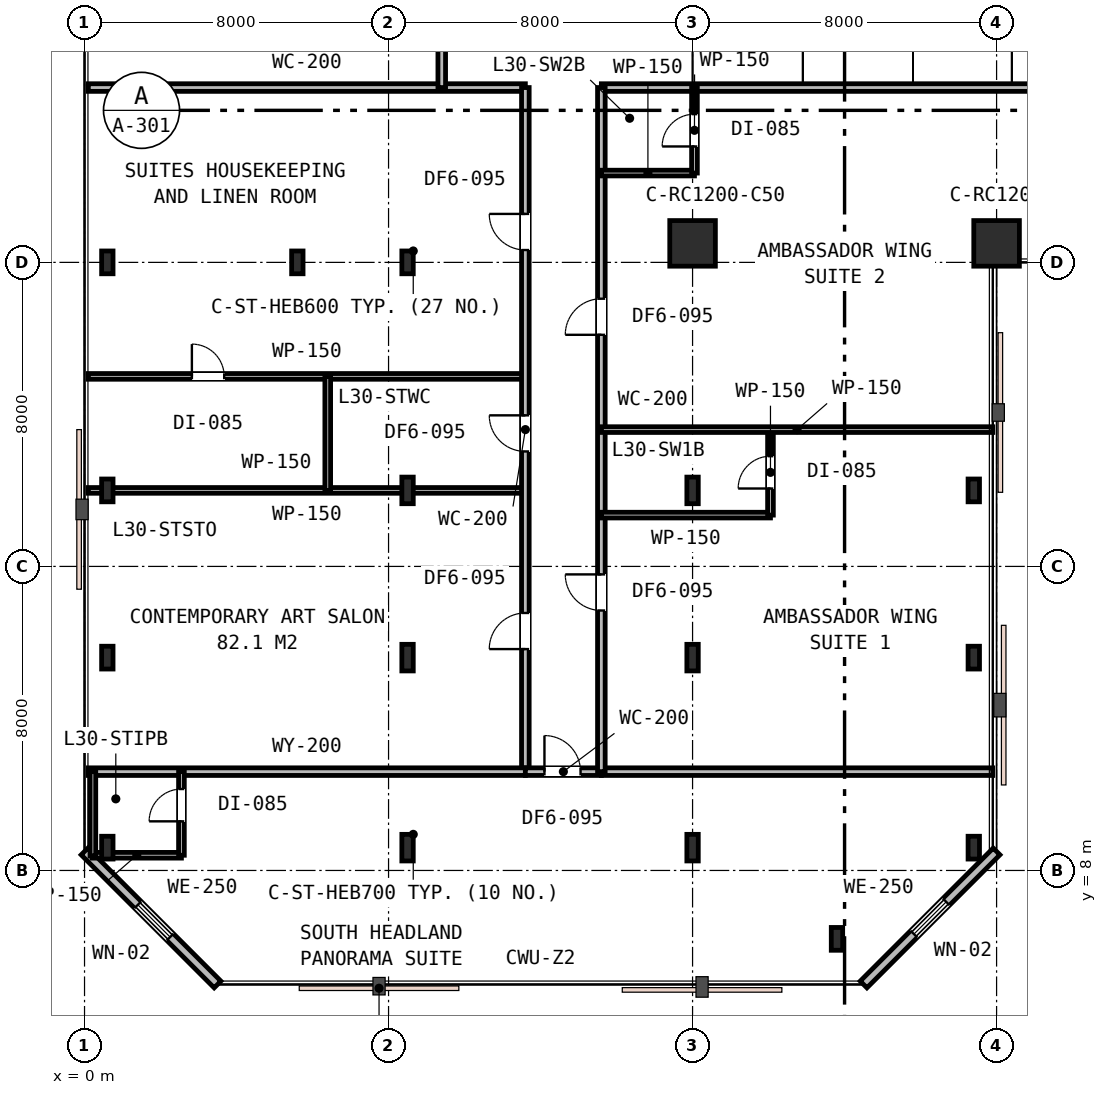
"""IFC4 building model, lengths in metres.
Left out: names, types, materials, properties, quantities, classifications, styles, units other than length and angle.
Written with IfcOpenShell. Run it as: python <this file> out.ifc"""

import sys

from ifc_helpers import new_model, si_unit, direction, frame, frame_2d, origin, origin_2d, place, context, subcontext, project, spatial, rectangle, i_section, extrude, element, fill, save


model = new_model("IFC4")
c1 = context("Model", 3, precision=1e-05, world=origin(), true_north=direction((0.0, 1.0)))
c2 = subcontext(c1, "Body", "Model", "MODEL_VIEW")
j1 = project(units=[si_unit("LENGTHUNIT", "METRE"), si_unit("PLANEANGLEUNIT", "RADIAN")], contexts=[c1])
p1 = place(None, origin())
s1 = spatial("IfcSite", under=j1, at=p1, CompositionType="ELEMENT")
p2 = place(p1, origin())
s2 = spatial("IfcBuilding", under=s1, at=p2, CompositionType="ELEMENT")
p3 = place(p2, frame((0.0, 0.0, 118.8)))
s3 = spatial("IfcBuildingStorey", under=s2, at=p3, CompositionType="ELEMENT", Elevation=118.8)
p4 = place(p3, frame((8.5, 24.0, 0.0), z_axis=(0.0, 0.0, 1.0), x_axis=(1.0, 0.0, 0.0)))
e1 = element("IfcColumn", 1, at=p4, inside=s3, PredefinedType="COLUMN", context=c2, shape_type="SweptSolid", body=[
    extrude(i_section(OverallWidth=0.3, OverallDepth=0.6, WebThickness=0.015, FlangeThickness=0.03, FilletRadius=0.027, at=origin_2d()), origin(), (0.0, 0.0, 1.0), 3.6),
])
for number, where, z_axis, x_axis in (
    (2, (16.0, 24.5, 0.0), (0.0, 0.0, 1.0), (1.0, 0.0, 0.0)),
    (3, (24.0, 24.5, 0.0), (0.0, 0.0, 1.0), (1.0, 0.0, 0.0)),
):
    element("IfcColumn", number, at=place(p3, frame(where, z_axis=z_axis, x_axis=x_axis)), inside=s3, PredefinedType="COLUMN", context=c2, shape_type="SweptSolid", body=[
        extrude(rectangle(XDim=1.2, YDim=1.2, at=origin_2d()), origin(), (0.0, 0.0, 1.0), 3.6),
    ])
for number, where, z_axis, x_axis in (
    (4, (5.6, 24.0, 0.0), (0.0, 0.0, 1.0), (1.0, 0.0, 0.0)),
    (5, (0.6, 24.0, 0.0), (0.0, 0.0, 1.0), (1.0, 0.0, 0.0)),
    (6, (0.6, 8.6, 0.0), (0.0, 0.0, 1.0), (1.0, 0.0, 0.0)),
    (7, (0.6, 13.6, 0.0), (0.0, 0.0, 1.0), (1.0, 0.0, 0.0)),
    (8, (0.6, 18.0, 0.0), (0.0, 0.0, 1.0), (1.0, 0.0, 0.0)),
    (9, (19.8, 6.2, 0.0), (0.0, 0.0, 1.0), (1.0, 0.0, 0.0)),
    (10, (23.4, 8.6, 0.0), (0.0, 0.0, 1.0), (1.0, 0.0, 0.0)),
    (11, (23.4, 13.6, 0.0), (0.0, 0.0, 1.0), (1.0, 0.0, 0.0)),
    (12, (23.4, 18.0, 0.0), (0.0, 0.0, 1.0), (1.0, 0.0, 0.0)),
):
    element("IfcColumn", number, at=place(p3, frame(where, z_axis=z_axis, x_axis=x_axis)), inside=s3, PredefinedType="COLUMN", context=c2, shape_type="SweptSolid", body=[
        extrude(i_section(OverallWidth=0.3, OverallDepth=0.6, WebThickness=0.015, FlangeThickness=0.03, FilletRadius=0.027, at=origin_2d()), origin(), (0.0, 0.0, 1.0), 3.6),
    ])
for number, where, z_axis, x_axis in (
    (13, (8.5, 8.6, 0.0), (0.0, 0.0, 1.0), (1.0, 0.0, 0.0)),
    (14, (16.0, 8.6, 0.0), (0.0, 0.0, 1.0), (1.0, 0.0, 0.0)),
    (15, (8.5, 13.6, 0.0), (0.0, 0.0, 1.0), (1.0, 0.0, 0.0)),
    (16, (16.0, 13.6, 0.0), (0.0, 0.0, 1.0), (1.0, 0.0, 0.0)),
    (17, (8.5, 18.0, 0.0), (0.0, 0.0, 1.0), (1.0, 0.0, 0.0)),
    (18, (16.0, 18.0, 0.0), (0.0, 0.0, 1.0), (1.0, 0.0, 0.0)),
):
    element("IfcColumn", number, at=place(p3, frame(where, z_axis=z_axis, x_axis=x_axis)), inside=s3, PredefinedType="COLUMN", context=c2, shape_type="SweptSolid", body=[
        extrude(i_section(OverallWidth=0.3, OverallDepth=0.7, WebThickness=0.017, FlangeThickness=0.032, FilletRadius=0.027, at=origin_2d()), origin(), (0.0, 0.0, 1.0), 3.6),
    ])
p5 = place(p3, frame((20.5, 5.0, 0.0), z_axis=(0.0, 0.0, 1.0), x_axis=(0.707106781187, 0.707106781187, 0.0)))
e19 = element("IfcWall", 19, at=p5, inside=s3, PredefinedType="STANDARD", context=c2, shape_type="SweptSolid", body=[
    extrude(rectangle(XDim=4.95, YDim=0.25, at=frame_2d((2.475, 0.0))), origin(), (0.0, 0.0, 1.0), 3.33),
])
p6 = place(p5, frame((1.875, 0.0, 0.85)))
e20 = element("IfcOpeningElement", 20, at=p6, cuts=e19, PredefinedType="OPENING", context=c2, shape_type="SweptSolid", body=[
    extrude(rectangle(XDim=1.2, YDim=1.6, at=frame_2d((0.6, 0.8))), frame((0.0, 0.135, 0.0), z_axis=(0.0, -1.0, 0.0), x_axis=(1.0, 0.0, 0.0)), (0.0, 0.0, 1.0), 0.27),
])
p7 = place(p3, frame((0.0, 8.5, 0.0), z_axis=(0.0, 0.0, 1.0), x_axis=(0.707106781187, -0.707106781187, 0.0)))
e21 = element("IfcWall", 21, at=p7, inside=s3, PredefinedType="STANDARD", context=c2, shape_type="SweptSolid", body=[
    extrude(rectangle(XDim=4.95, YDim=0.25, at=frame_2d((2.475, 0.0))), origin(), (0.0, 0.0, 1.0), 3.33),
])
p8 = place(p7, frame((1.985, 0.0, 0.85)))
e22 = element("IfcOpeningElement", 22, at=p8, cuts=e21, PredefinedType="OPENING", context=c2, shape_type="SweptSolid", body=[
    extrude(rectangle(XDim=1.2, YDim=1.6, at=frame_2d((0.6, 0.8))), frame((0.0, 0.135, 0.0), z_axis=(0.0, -1.0, 0.0), x_axis=(1.0, 0.0, 0.0)), (0.0, 0.0, 1.0), 0.27),
])
p9 = place(p3, frame((0.1, 28.6, 0.0), z_axis=(0.0, 0.0, 1.0), x_axis=(1.0, 0.0, 0.0)))
e23 = element("IfcWall", 23, at=p9, inside=s3, PredefinedType="PARTITIONING", context=c2, shape_type="SweptSolid", body=[
    extrude(rectangle(XDim=11.5, YDim=0.2, at=frame_2d((5.75, 0.0))), origin(), (0.0, 0.0, 1.0), 2.87),
])
p10 = place(p3, frame((13.6, 28.6, 0.0), z_axis=(0.0, 0.0, 1.0), x_axis=(1.0, 0.0, 0.0)))
e24 = element("IfcWall", 24, at=p10, inside=s3, PredefinedType="PARTITIONING", context=c2, shape_type="SweptSolid", body=[
    extrude(rectangle(XDim=30.6, YDim=0.2, at=frame_2d((15.3, 0.0))), origin(), (0.0, 0.0, 1.0), 2.87),
])
p11 = place(p10, frame((13.325, 0.0, 0.0)))
e25 = element("IfcOpeningElement", 25, at=p11, cuts=e24, PredefinedType="OPENING", context=c2, shape_type="SweptSolid", body=[
    extrude(rectangle(XDim=0.95, YDim=2.15, at=frame_2d((0.475, 1.075))), frame((0.0, 0.11, 0.0), z_axis=(0.0, -1.0, 0.0), x_axis=(1.0, 0.0, 0.0)), (0.0, 0.0, 1.0), 0.22),
])
p12 = place(p10, frame((18.761, 0.0, 0.0)))
e26 = element("IfcOpeningElement", 26, at=p12, cuts=e24, PredefinedType="OPENING", context=c2, shape_type="SweptSolid", body=[
    extrude(rectangle(XDim=0.95, YDim=2.15, at=frame_2d((0.475, 1.075))), frame((0.0, 0.11, 0.0), z_axis=(0.0, -1.0, 0.0), x_axis=(1.0, 0.0, 0.0)), (0.0, 0.0, 1.0), 0.22),
])
p13 = place(p10, frame((25.503, 0.0, 0.0)))
e27 = element("IfcOpeningElement", 27, at=p13, cuts=e24, PredefinedType="OPENING", context=c2, shape_type="SweptSolid", body=[
    extrude(rectangle(XDim=0.95, YDim=2.15, at=frame_2d((0.475, 1.075))), frame((0.0, 0.11, 0.0), z_axis=(0.0, -1.0, 0.0), x_axis=(1.0, 0.0, 0.0)), (0.0, 0.0, 1.0), 0.22),
])
p14 = place(p3, frame((0.1, 18.0, 0.0), z_axis=(0.0, 0.0, 1.0), x_axis=(1.0, 0.0, 0.0)))
e28 = element("IfcWall", 28, at=p14, inside=s3, PredefinedType="PARTITIONING", context=c2, shape_type="SweptSolid", body=[
    extrude(rectangle(XDim=11.5, YDim=0.15, at=frame_2d((5.75, 0.0))), origin(), (0.0, 0.0, 1.0), 2.87),
])
p15 = place(p3, frame((0.1, 21.0, 0.0), z_axis=(0.0, 0.0, 1.0), x_axis=(1.0, 0.0, 0.0)))
e29 = element("IfcWall", 29, at=p15, inside=s3, PredefinedType="PARTITIONING", context=c2, shape_type="SweptSolid", body=[
    extrude(rectangle(XDim=11.5, YDim=0.15, at=frame_2d((5.75, 0.0))), origin(), (0.0, 0.0, 1.0), 2.87),
])
p16 = place(p15, frame((2.725, 0.0, 0.0)))
e30 = element("IfcOpeningElement", 30, at=p16, cuts=e29, PredefinedType="OPENING", context=c2, shape_type="SweptSolid", body=[
    extrude(rectangle(XDim=0.85, YDim=2.15, at=frame_2d((0.425, 1.075))), frame((0.0, 0.085, 0.0), z_axis=(0.0, -1.0, 0.0), x_axis=(1.0, 0.0, 0.0)), (0.0, 0.0, 1.0), 0.17),
])
p17 = place(p3, frame((6.4, 18.0, 0.0), z_axis=(0.0, 0.0, 1.0), x_axis=(0.0, 1.0, 0.0)))
e31 = element("IfcWall", 31, at=p17, inside=s3, PredefinedType="PARTITIONING", context=c2, shape_type="SweptSolid", body=[
    extrude(rectangle(XDim=3.0, YDim=0.15, at=frame_2d((1.5, 0.0))), origin(), (0.0, 0.0, 1.0), 2.87),
])
p18 = place(p3, frame((11.6, 10.6, 0.0), z_axis=(0.0, 0.0, 1.0), x_axis=(0.0, 1.0, 0.0)))
e32 = element("IfcWall", 32, at=p18, inside=s3, PredefinedType="PARTITIONING", context=c2, shape_type="SweptSolid", body=[
    extrude(rectangle(XDim=18.0, YDim=0.2, at=frame_2d((9.0, 0.0))), origin(), (0.0, 0.0, 1.0), 2.87),
])
p19 = place(p18, frame((8.425, 0.0, 0.0)))
e33 = element("IfcOpeningElement", 33, at=p19, cuts=e32, PredefinedType="OPENING", context=c2, shape_type="SweptSolid", body=[
    extrude(rectangle(XDim=0.95, YDim=2.15, at=frame_2d((0.475, 1.075))), frame((0.0, 0.11, 0.0), z_axis=(0.0, -1.0, 0.0), x_axis=(1.0, 0.0, 0.0)), (0.0, 0.0, 1.0), 0.22),
])
p20 = place(p18, frame((13.725, 0.0, 0.0)))
e34 = element("IfcOpeningElement", 34, at=p20, cuts=e32, PredefinedType="OPENING", context=c2, shape_type="SweptSolid", body=[
    extrude(rectangle(XDim=0.95, YDim=2.15, at=frame_2d((0.475, 1.075))), frame((0.0, 0.11, 0.0), z_axis=(0.0, -1.0, 0.0), x_axis=(1.0, 0.0, 0.0)), (0.0, 0.0, 1.0), 0.22),
])
p21 = place(p18, frame((3.225, 0.0, 0.0)))
e35 = element("IfcOpeningElement", 35, at=p21, cuts=e32, PredefinedType="OPENING", context=c2, shape_type="SweptSolid", body=[
    extrude(rectangle(XDim=0.95, YDim=2.15, at=frame_2d((0.475, 1.075))), frame((0.0, 0.11, 0.0), z_axis=(0.0, -1.0, 0.0), x_axis=(1.0, 0.0, 0.0)), (0.0, 0.0, 1.0), 0.22),
])
p22 = place(p3, frame((9.4, 28.6, 0.0), z_axis=(0.0, 0.0, 1.0), x_axis=(0.0, 1.0, 0.0)))
e36 = element("IfcWall", 36, at=p22, inside=s3, PredefinedType="PARTITIONING", context=c2, shape_type="SweptSolid", body=[
    extrude(rectangle(XDim=12.9, YDim=0.2, at=frame_2d((6.45, 0.0))), origin(), (0.0, 0.0, 1.0), 2.87),
])
p23 = place(p22, frame((3.005, 0.0, 0.0)))
e37 = element("IfcOpeningElement", 37, at=p23, cuts=e36, PredefinedType="OPENING", context=c2, shape_type="SweptSolid", body=[
    extrude(rectangle(XDim=0.95, YDim=2.15, at=frame_2d((0.475, 1.075))), frame((0.0, 0.11, 0.0), z_axis=(0.0, -1.0, 0.0), x_axis=(1.0, 0.0, 0.0)), (0.0, 0.0, 1.0), 0.22),
])
p24 = place(p22, frame((6.025, 0.0, 0.0)))
e38 = element("IfcOpeningElement", 38, at=p24, cuts=e36, PredefinedType="OPENING", context=c2, shape_type="SweptSolid", body=[
    extrude(rectangle(XDim=0.95, YDim=2.15, at=frame_2d((0.475, 1.075))), frame((0.0, 0.11, 0.0), z_axis=(0.0, -1.0, 0.0), x_axis=(1.0, 0.0, 0.0)), (0.0, 0.0, 1.0), 0.22),
])
p25 = place(p22, frame((10.275, 0.0, 0.0)))
e39 = element("IfcOpeningElement", 39, at=p25, cuts=e36, PredefinedType="OPENING", context=c2, shape_type="SweptSolid", body=[
    extrude(rectangle(XDim=0.95, YDim=2.15, at=frame_2d((0.475, 1.075))), frame((0.0, 0.11, 0.0), z_axis=(0.0, -1.0, 0.0), x_axis=(1.0, 0.0, 0.0)), (0.0, 0.0, 1.0), 0.22),
])
p26 = place(p3, frame((0.1, 10.6, 0.0), z_axis=(0.0, 0.0, 1.0), x_axis=(1.0, 0.0, 0.0)))
e40 = element("IfcWall", 40, at=p26, inside=s3, PredefinedType="PARTITIONING", context=c2, shape_type="SweptSolid", body=[
    extrude(rectangle(XDim=11.5, YDim=0.2, at=frame_2d((5.75, 0.0))), origin(), (0.0, 0.0, 1.0), 2.87),
])
p27 = place(p3, frame((13.6, 10.6, 0.0), z_axis=(0.0, 0.0, 1.0), x_axis=(1.0, 0.0, 0.0)))
e41 = element("IfcWall", 41, at=p27, inside=s3, PredefinedType="PARTITIONING", context=c2, shape_type="SweptSolid", body=[
    extrude(rectangle(XDim=10.3, YDim=0.2, at=frame_2d((5.15, 0.0))), origin(), (0.0, 0.0, 1.0), 2.87),
])
p28 = place(p3, frame((11.6, 10.6, 0.0), z_axis=(0.0, 0.0, 1.0), x_axis=(1.0, 0.0, 0.0)))
e42 = element("IfcWall", 42, at=p28, inside=s3, PredefinedType="PARTITIONING", context=c2, shape_type="SweptSolid", body=[
    extrude(rectangle(XDim=2.0, YDim=0.2, at=frame_2d((1.0, 0.0))), origin(), (0.0, 0.0, 1.0), 3.01),
])
p29 = place(p28, frame((0.502, 0.0, 0.0)))
e43 = element("IfcOpeningElement", 43, at=p29, cuts=e42, PredefinedType="OPENING", context=c2, shape_type="SweptSolid", body=[
    extrude(rectangle(XDim=0.95, YDim=2.15, at=frame_2d((0.475, 1.075))), frame((0.0, 0.11, 0.0), z_axis=(0.0, -1.0, 0.0), x_axis=(1.0, 0.0, 0.0)), (0.0, 0.0, 1.0), 0.22),
])
p30 = place(p3, frame((0.2, 8.4, 0.0), z_axis=(0.0, 0.0, 1.0), x_axis=(1.0, 0.0, 0.0)))
e44 = element("IfcWall", 44, at=p30, inside=s3, PredefinedType="PARTITIONING", context=c2, shape_type="SweptSolid", body=[
    extrude(rectangle(XDim=2.35, YDim=0.15, at=frame_2d((1.175, 0.0))), origin(), (0.0, 0.0, 1.0), 2.87),
])
p31 = place(p3, frame((2.55, 8.4, 0.0), z_axis=(0.0, 0.0, 1.0), x_axis=(0.0, 1.0, 0.0)))
e45 = element("IfcWall", 45, at=p31, inside=s3, PredefinedType="PARTITIONING", context=c2, shape_type="SweptSolid", body=[
    extrude(rectangle(XDim=2.2, YDim=0.15, at=frame_2d((1.1, 0.0))), origin(), (0.0, 0.0, 1.0), 2.87),
])
p32 = place(p31, frame((0.892, 0.0, 0.0)))
e46 = element("IfcOpeningElement", 46, at=p32, cuts=e45, PredefinedType="OPENING", context=c2, shape_type="SweptSolid", body=[
    extrude(rectangle(XDim=0.85, YDim=2.15, at=frame_2d((0.425, 1.075))), frame((0.0, 0.085, 0.0), z_axis=(0.0, -1.0, 0.0), x_axis=(1.0, 0.0, 0.0)), (0.0, 0.0, 1.0), 0.17),
])
p33 = place(p3, frame((0.22, 8.38, 0.0), z_axis=(0.0, 0.0, 1.0), x_axis=(0.0, 1.0, 0.0)))
e47 = element("IfcWall", 47, at=p33, inside=s3, PredefinedType="PARTITIONING", context=c2, shape_type="SweptSolid", body=[
    extrude(rectangle(XDim=2.22, YDim=0.15, at=frame_2d((1.11, 0.0))), origin(), (0.0, 0.0, 1.0), 2.87),
])
p34 = place(p3, frame((13.6, 10.6, 0.0), z_axis=(0.0, 0.0, 1.0), x_axis=(0.0, 1.0, 0.0)))
e48 = element("IfcWall", 48, at=p34, inside=s3, PredefinedType="PARTITIONING", context=c2, shape_type="SweptSolid", body=[
    extrude(rectangle(XDim=18.0, YDim=0.2, at=frame_2d((9.0, 0.0))), origin(), (0.0, 0.0, 1.0), 2.87),
])
p35 = place(p34, frame((4.24, 0.0, 0.0)))
e49 = element("IfcOpeningElement", 49, at=p35, cuts=e48, PredefinedType="OPENING", context=c2, shape_type="SweptSolid", body=[
    extrude(rectangle(XDim=0.95, YDim=2.15, at=frame_2d((0.475, 1.075))), frame((0.0, 0.11, 0.0), z_axis=(0.0, -1.0, 0.0), x_axis=(1.0, 0.0, 0.0)), (0.0, 0.0, 1.0), 0.22),
])
p36 = place(p34, frame((11.494, 0.0, 0.0)))
e50 = element("IfcOpeningElement", 50, at=p36, cuts=e48, PredefinedType="OPENING", context=c2, shape_type="SweptSolid", body=[
    extrude(rectangle(XDim=0.95, YDim=2.15, at=frame_2d((0.475, 1.075))), frame((0.0, 0.11, 0.0), z_axis=(0.0, -1.0, 0.0), x_axis=(1.0, 0.0, 0.0)), (0.0, 0.0, 1.0), 0.22),
])
p37 = place(p3, frame((13.6, 17.35, 0.0), z_axis=(0.0, 0.0, 1.0), x_axis=(1.0, 0.0, 0.0)))
e51 = element("IfcWall", 51, at=p37, inside=s3, PredefinedType="PARTITIONING", context=c2, shape_type="SweptSolid", body=[
    extrude(rectangle(XDim=4.45, YDim=0.15, at=frame_2d((2.225, 0.0))), origin(), (0.0, 0.0, 1.0), 2.87),
])
p38 = place(p3, frame((18.05, 17.35, 0.0), z_axis=(0.0, 0.0, 1.0), x_axis=(0.0, 1.0, 0.0)))
e52 = element("IfcWall", 52, at=p38, inside=s3, PredefinedType="PARTITIONING", context=c2, shape_type="SweptSolid", body=[
    extrude(rectangle(XDim=2.25, YDim=0.15, at=frame_2d((1.125, 0.0))), origin(), (0.0, 0.0, 1.0), 2.87),
])
p39 = place(p38, frame((0.7, 0.0, 0.0)))
e53 = element("IfcOpeningElement", 53, at=p39, cuts=e52, PredefinedType="OPENING", context=c2, shape_type="SweptSolid", body=[
    extrude(rectangle(XDim=0.85, YDim=2.15, at=frame_2d((0.425, 1.075))), frame((0.0, 0.085, 0.0), z_axis=(0.0, -1.0, 0.0), x_axis=(1.0, 0.0, 0.0)), (0.0, 0.0, 1.0), 0.17),
])
p40 = place(p3, frame((13.6, 19.6, 0.0), z_axis=(0.0, 0.0, 1.0), x_axis=(1.0, 0.0, 0.0)))
e54 = element("IfcWall", 54, at=p40, inside=s3, PredefinedType="PARTITIONING", context=c2, shape_type="SweptSolid", body=[
    extrude(rectangle(XDim=10.3, YDim=0.15, at=frame_2d((5.15, 0.0))), origin(), (0.0, 0.0, 1.0), 2.87),
])
p41 = place(p3, frame((13.6, 26.35, 0.0), z_axis=(0.0, 0.0, 1.0), x_axis=(1.0, 0.0, 0.0)))
e55 = element("IfcWall", 55, at=p41, inside=s3, PredefinedType="PARTITIONING", context=c2, shape_type="SweptSolid", body=[
    extrude(rectangle(XDim=2.45, YDim=0.15, at=frame_2d((1.225, 0.0))), origin(), (0.0, 0.0, 1.0), 2.87),
])
p42 = place(p3, frame((16.05, 26.35, 0.0), z_axis=(0.0, 0.0, 1.0), x_axis=(0.0, 1.0, 0.0)))
e56 = element("IfcWall", 56, at=p42, inside=s3, PredefinedType="PARTITIONING", context=c2, shape_type="SweptSolid", body=[
    extrude(rectangle(XDim=2.25, YDim=0.15, at=frame_2d((1.125, 0.0))), origin(), (0.0, 0.0, 1.0), 2.87),
])
p43 = place(p42, frame((0.7, 0.0, 0.0)))
e57 = element("IfcOpeningElement", 57, at=p43, cuts=e56, PredefinedType="OPENING", context=c2, shape_type="SweptSolid", body=[
    extrude(rectangle(XDim=0.85, YDim=2.15, at=frame_2d((0.425, 1.075))), frame((0.0, 0.085, 0.0), z_axis=(0.0, -1.0, 0.0), x_axis=(1.0, 0.0, 0.0)), (0.0, 0.0, 1.0), 0.17),
])
p44 = place(p6, origin())
e58 = element("IfcWindow", 58, at=p44, inside=s3, PartitioningType="SINGLE_PANEL", PredefinedType="WINDOW", context=c2, shape_type="SweptSolid", body=[
    extrude(rectangle(XDim=1.2, YDim=1.6, at=frame_2d((0.6, 0.8))), frame((0.0, 0.03, 0.0), z_axis=(0.0, -1.0, 0.0), x_axis=(1.0, 0.0, 0.0)), (0.0, 0.0, 1.0), 0.06),
])
fill(e20, e58)
p45 = place(p8, origin())
e59 = element("IfcWindow", 59, at=p45, inside=s3, PartitioningType="SINGLE_PANEL", PredefinedType="WINDOW", context=c2, shape_type="SweptSolid", body=[
    extrude(rectangle(XDim=1.2, YDim=1.6, at=frame_2d((0.6, 0.8))), frame((0.0, 0.03, 0.0), z_axis=(0.0, -1.0, 0.0), x_axis=(1.0, 0.0, 0.0)), (0.0, 0.0, 1.0), 0.06),
])
fill(e22, e59)
p46 = place(p19, origin())
e60 = element("IfcDoor", 60, at=p46, inside=s3, OperationType="SINGLE_SWING_RIGHT", PredefinedType="DOOR", context=c2, shape_type="SweptSolid", body=[
    extrude(rectangle(XDim=0.95, YDim=2.15, at=frame_2d((0.475, 1.075))), frame((0.0, 0.025, 0.0), z_axis=(0.0, -1.0, 0.0), x_axis=(1.0, 0.0, 0.0)), (0.0, 0.0, 1.0), 0.05),
])
fill(e33, e60)
p47 = place(p16, origin())
e61 = element("IfcDoor", 61, at=p47, inside=s3, OperationType="SINGLE_SWING_LEFT", PredefinedType="DOOR", context=c2, shape_type="SweptSolid", body=[
    extrude(rectangle(XDim=0.85, YDim=2.15, at=frame_2d((0.425, 1.075))), frame((0.0, 0.025, 0.0), z_axis=(0.0, -1.0, 0.0), x_axis=(1.0, 0.0, 0.0)), (0.0, 0.0, 1.0), 0.05),
])
fill(e30, e61)
p48 = place(p20, origin())
e62 = element("IfcDoor", 62, at=p48, inside=s3, OperationType="SINGLE_SWING_RIGHT", PredefinedType="DOOR", context=c2, shape_type="SweptSolid", body=[
    extrude(rectangle(XDim=0.95, YDim=2.15, at=frame_2d((0.475, 1.075))), frame((0.0, 0.025, 0.0), z_axis=(0.0, -1.0, 0.0), x_axis=(1.0, 0.0, 0.0)), (0.0, 0.0, 1.0), 0.05),
])
fill(e34, e62)
p49 = place(p21, origin())
e63 = element("IfcDoor", 63, at=p49, inside=s3, OperationType="SINGLE_SWING_LEFT", PredefinedType="DOOR", context=c2, shape_type="SweptSolid", body=[
    extrude(rectangle(XDim=0.95, YDim=2.15, at=frame_2d((0.475, 1.075))), frame((0.0, 0.025, 0.0), z_axis=(0.0, -1.0, 0.0), x_axis=(1.0, 0.0, 0.0)), (0.0, 0.0, 1.0), 0.05),
])
fill(e35, e63)
p50 = place(p29, origin())
e64 = element("IfcDoor", 64, at=p50, inside=s3, OperationType="SINGLE_SWING_LEFT", PredefinedType="DOOR", context=c2, shape_type="SweptSolid", body=[
    extrude(rectangle(XDim=0.95, YDim=2.15, at=frame_2d((0.475, 1.075))), frame((0.0, 0.025, 0.0), z_axis=(0.0, -1.0, 0.0), x_axis=(1.0, 0.0, 0.0)), (0.0, 0.0, 1.0), 0.05),
])
fill(e43, e64)
p51 = place(p32, origin())
e65 = element("IfcDoor", 65, at=p51, inside=s3, OperationType="SINGLE_SWING_LEFT", PredefinedType="DOOR", context=c2, shape_type="SweptSolid", body=[
    extrude(rectangle(XDim=0.85, YDim=2.15, at=frame_2d((0.425, 1.075))), frame((0.0, 0.025, 0.0), z_axis=(0.0, -1.0, 0.0), x_axis=(1.0, 0.0, 0.0)), (0.0, 0.0, 1.0), 0.05),
])
fill(e46, e65)
p52 = place(p35, origin())
e66 = element("IfcDoor", 66, at=p52, inside=s3, OperationType="SINGLE_SWING_RIGHT", PredefinedType="DOOR", context=c2, shape_type="SweptSolid", body=[
    extrude(rectangle(XDim=0.95, YDim=2.15, at=frame_2d((0.475, 1.075))), frame((0.0, 0.025, 0.0), z_axis=(0.0, -1.0, 0.0), x_axis=(1.0, 0.0, 0.0)), (0.0, 0.0, 1.0), 0.05),
])
fill(e49, e66)
p53 = place(p39, origin())
e67 = element("IfcDoor", 67, at=p53, inside=s3, OperationType="SINGLE_SWING_LEFT", PredefinedType="DOOR", context=c2, shape_type="SweptSolid", body=[
    extrude(rectangle(XDim=0.85, YDim=2.15, at=frame_2d((0.425, 1.075))), frame((0.0, 0.025, 0.0), z_axis=(0.0, -1.0, 0.0), x_axis=(1.0, 0.0, 0.0)), (0.0, 0.0, 1.0), 0.05),
])
fill(e53, e67)
p54 = place(p36, origin())
e68 = element("IfcDoor", 68, at=p54, inside=s3, OperationType="SINGLE_SWING_LEFT", PredefinedType="DOOR", context=c2, shape_type="SweptSolid", body=[
    extrude(rectangle(XDim=0.95, YDim=2.15, at=frame_2d((0.475, 1.075))), frame((0.0, 0.025, 0.0), z_axis=(0.0, -1.0, 0.0), x_axis=(1.0, 0.0, 0.0)), (0.0, 0.0, 1.0), 0.05),
])
fill(e50, e68)
p55 = place(p43, origin())
e69 = element("IfcDoor", 69, at=p55, inside=s3, OperationType="SINGLE_SWING_LEFT", PredefinedType="DOOR", context=c2, shape_type="SweptSolid", body=[
    extrude(rectangle(XDim=0.85, YDim=2.15, at=frame_2d((0.425, 1.075))), frame((0.0, 0.025, 0.0), z_axis=(0.0, -1.0, 0.0), x_axis=(1.0, 0.0, 0.0)), (0.0, 0.0, 1.0), 0.05),
])
fill(e57, e69)
save(model, sys.argv[1])
